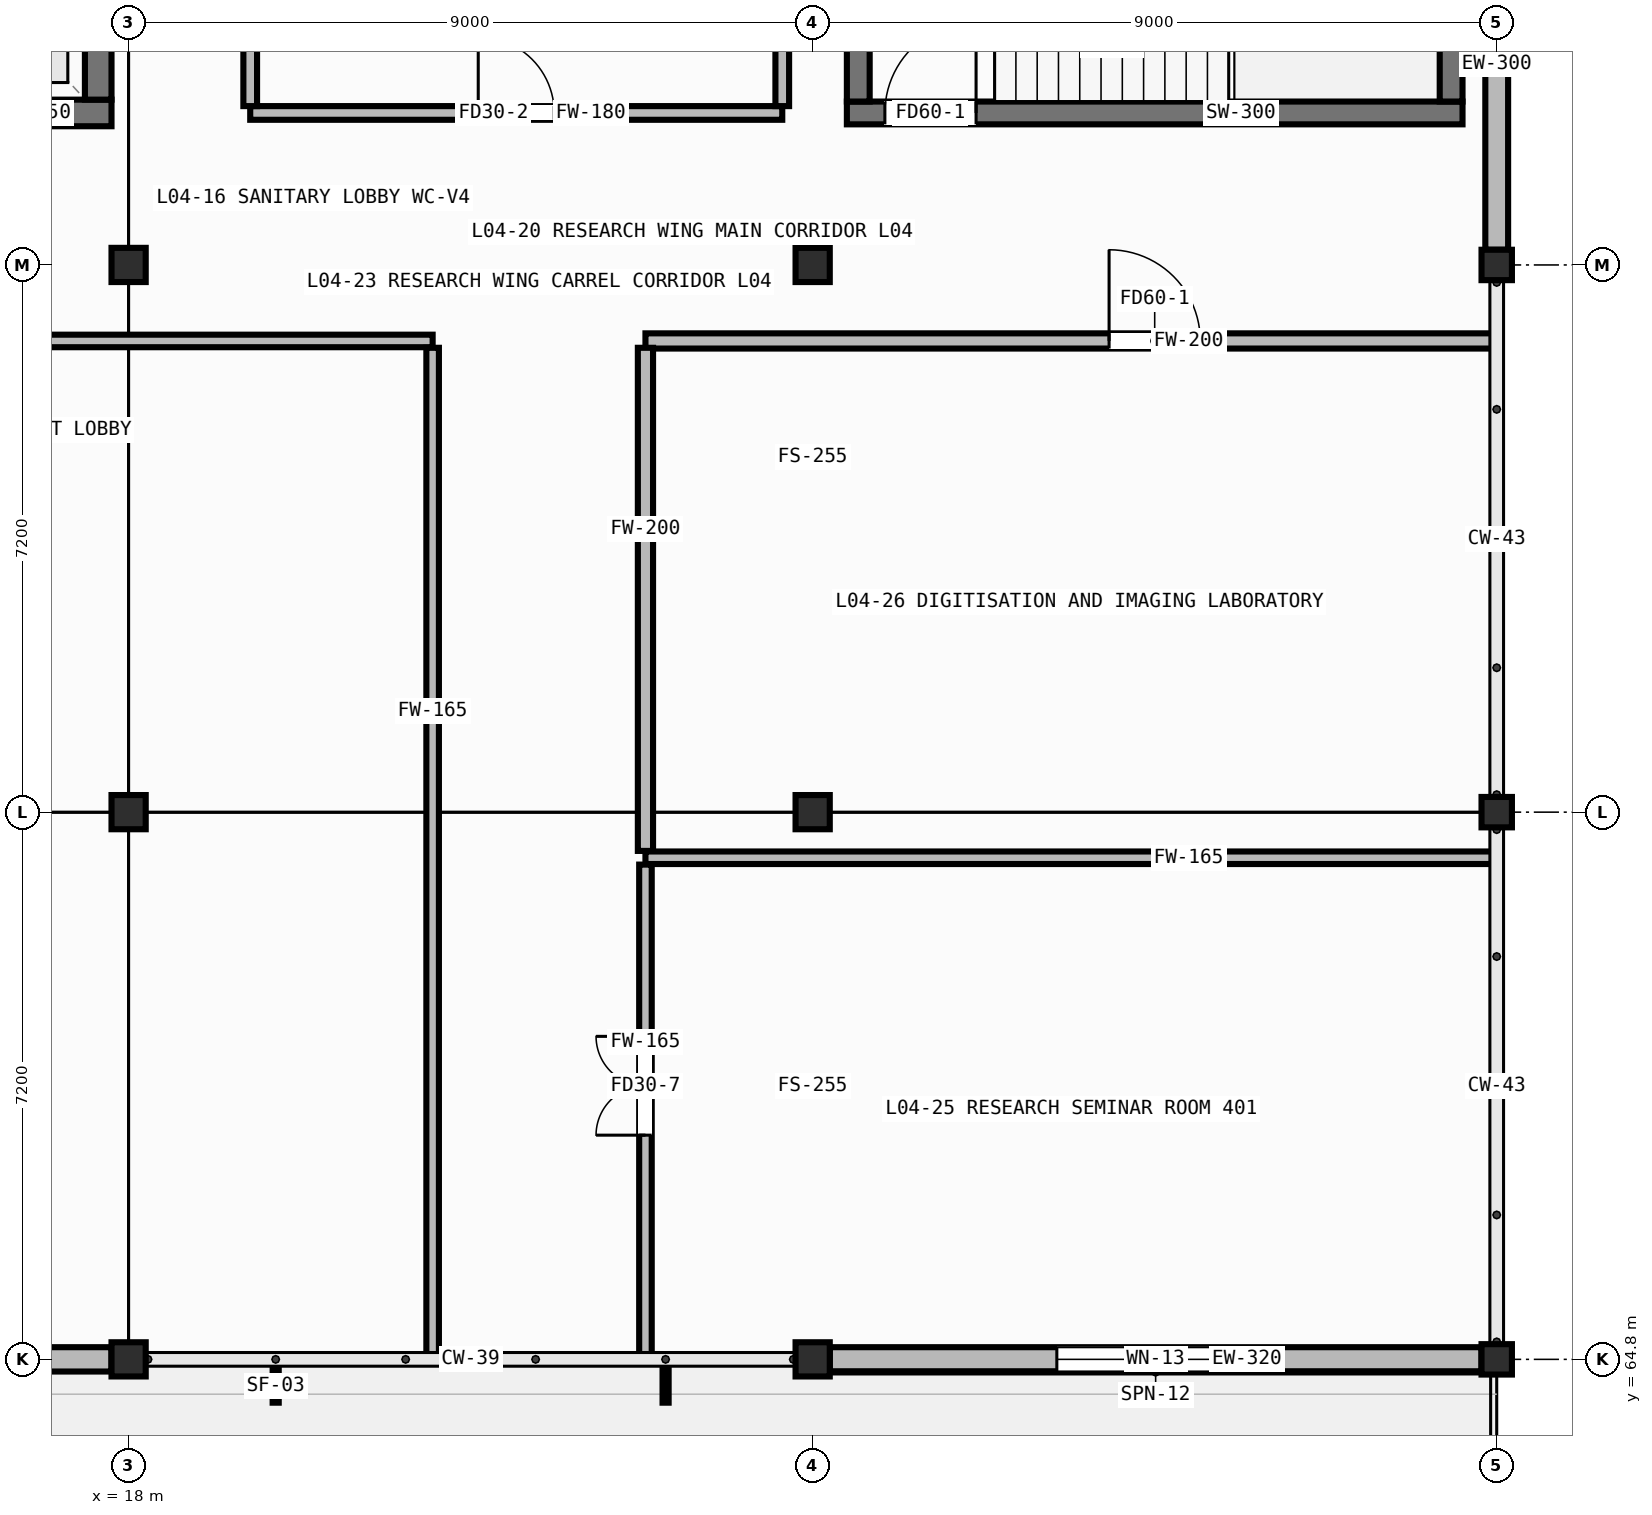
"""IFC4 building model, lengths in metres.
Left out: names, types, materials, properties, quantities, classifications, styles, units other than length and angle.
Written with IfcOpenShell. Run it as: python <this file> out.ifc"""

import sys

from ifc_helpers import new_model, si_unit, direction, frame, frame_2d, origin, origin_2d, place, context, subcontext, project, spatial, rectangle, hollow_rectangle, extrude, element, fill, save


model = new_model("IFC4")
c1 = context("Model", 3, precision=1e-05, world=origin(), true_north=direction((0.0, 1.0)))
c2 = subcontext(c1, "Body", "Model", "MODEL_VIEW")
j1 = project(units=[si_unit("LENGTHUNIT", "METRE"), si_unit("PLANEANGLEUNIT", "RADIAN")], contexts=[c1])
p1 = place(None, origin())
s1 = spatial("IfcSite", under=j1, at=p1, CompositionType="ELEMENT")
p2 = place(p1, origin())
s2 = spatial("IfcBuilding", under=s1, at=p2, CompositionType="ELEMENT")
p3 = place(p2, frame((0.0, 0.0, 12.8)))
s3 = spatial("IfcBuildingStorey", under=s2, at=p3, CompositionType="ELEMENT", Elevation=12.8)
for number, where, z_axis, x_axis in (
    (1, (18.0, 64.8, 0.0), (0.0, 0.0, 1.0), (1.0, 0.0, 0.0)),
    (2, (18.0, 72.0, 0.0), (0.0, 0.0, 1.0), (1.0, 0.0, 0.0)),
    (3, (18.0, 79.2, 0.0), (0.0, 0.0, 1.0), (1.0, 0.0, 0.0)),
    (4, (27.0, 64.8, 0.0), (0.0, 0.0, 1.0), (1.0, 0.0, 0.0)),
    (5, (27.0, 72.0, 0.0), (0.0, 0.0, 1.0), (1.0, 0.0, 0.0)),
    (6, (27.0, 79.2, 0.0), (0.0, 0.0, 1.0), (1.0, 0.0, 0.0)),
):
    element("IfcColumn", number, at=place(p3, frame(where, z_axis=z_axis, x_axis=x_axis)), inside=s3, PredefinedType="COLUMN", context=c2, shape_type="SweptSolid", body=[
        extrude(hollow_rectangle(XDim=0.45, YDim=0.45, WallThickness=0.019, at=origin_2d()), origin(), (0.0, 0.0, 1.0), 4.2),
    ])
for number, where, z_axis, x_axis in (
    (7, (36.0, 64.8, 0.0), (0.0, 0.0, 1.0), (1.0, 0.0, 0.0)),
    (8, (36.0, 72.0, 0.0), (0.0, 0.0, 1.0), (1.0, 0.0, 0.0)),
    (9, (36.0, 79.2, 0.0), (0.0, 0.0, 1.0), (1.0, 0.0, 0.0)),
):
    element("IfcColumn", number, at=place(p3, frame(where, z_axis=z_axis, x_axis=x_axis)), inside=s3, PredefinedType="COLUMN", context=c2, shape_type="SweptSolid", body=[
        extrude(hollow_rectangle(XDim=0.4, YDim=0.4, WallThickness=0.016, at=origin_2d()), origin(), (0.0, 0.0, 1.0), 4.2),
    ])
p4 = place(p3, frame((9.225, 64.8, 0.0), z_axis=(0.0, 0.0, 1.0), x_axis=(1.0, 0.0, 0.0)))
e10 = element("IfcWall", 10, at=p4, inside=s3, PredefinedType="STANDARD", context=c2, shape_type="SweptSolid", body=[
    extrude(rectangle(XDim=8.55, YDim=0.32, at=frame_2d((4.275, 0.0))), origin(), (0.0, 0.0, 1.0), 3.49),
])
p5 = place(p4, frame((3.4, 0.0, 0.0)))
e11 = element("IfcOpeningElement", 11, at=p5, cuts=e10, PredefinedType="OPENING", context=c2, shape_type="SweptSolid", body=[
    extrude(rectangle(XDim=1.75, YDim=2.12, at=frame_2d((0.875, 1.06))), frame((0.0, 0.172, 0.0), z_axis=(0.0, -1.0, 0.0), x_axis=(1.0, 0.0, 0.0)), (0.0, 0.0, 1.0), 0.344),
])
p6 = place(p3, frame((27.225, 64.8, 0.0), z_axis=(0.0, 0.0, 1.0), x_axis=(1.0, 0.0, 0.0)))
e12 = element("IfcWall", 12, at=p6, inside=s3, PredefinedType="STANDARD", context=c2, shape_type="SweptSolid", body=[
    extrude(rectangle(XDim=8.575, YDim=0.32, at=frame_2d((4.288, 0.0))), origin(), (0.0, 0.0, 1.0), 3.49),
])
p7 = place(p6, frame((2.988, 0.0, 0.85)))
e13 = element("IfcOpeningElement", 13, at=p7, cuts=e12, PredefinedType="OPENING", context=c2, shape_type="SweptSolid", body=[
    extrude(rectangle(XDim=2.6, YDim=1.6, at=frame_2d((1.3, 0.8))), frame((0.0, 0.172, 0.0), z_axis=(0.0, -1.0, 0.0), x_axis=(1.0, 0.0, 0.0)), (0.0, 0.0, 1.0), 0.344),
])
p8 = place(p3, frame((36.0, 86.2, 0.0), z_axis=(0.0, 0.0, 1.0), x_axis=(0.0, -1.0, 0.0)))
e14 = element("IfcWall", 14, at=p8, inside=s3, PredefinedType="STANDARD", context=c2, shape_type="SweptSolid", body=[
    extrude(rectangle(XDim=6.8, YDim=0.3, at=frame_2d((3.4, 0.0))), origin(), (0.0, 0.0, 1.0), 3.49),
])
p9 = place(p3, frame((27.45, 81.2, 0.0), z_axis=(0.0, 0.0, 1.0), x_axis=(1.0, 0.0, 0.0)))
e15 = element("IfcWall", 15, at=p9, inside=s3, PredefinedType="SHEAR", context=c2, shape_type="SweptSolid", body=[
    extrude(rectangle(XDim=8.1, YDim=0.3, at=frame_2d((4.05, 0.0))), origin(), (0.0, 0.0, 1.0), 3.94),
])
p10 = place(p9, frame((0.5, 0.0, 0.0)))
e16 = element("IfcOpeningElement", 16, at=p10, cuts=e15, PredefinedType="OPENING", context=c2, shape_type="SweptSolid", body=[
    extrude(rectangle(XDim=1.2, YDim=2.1, at=frame_2d((0.6, 1.05))), frame((0.0, 0.162, 0.0), z_axis=(0.0, -1.0, 0.0), x_axis=(1.0, 0.0, 0.0)), (0.0, 0.0, 1.0), 0.324),
])
for number, where, z_axis, x_axis in (
    (17, (27.6, 81.35, 0.0), (0.0, 0.0, 1.0), (0.0, 1.0, 0.0)),
    (18, (35.4, 81.35, 0.0), (0.0, 0.0, 1.0), (0.0, 1.0, 0.0)),
):
    element("IfcWall", number, at=place(p3, frame(where, z_axis=z_axis, x_axis=x_axis)), inside=s3, PredefinedType="SHEAR", context=c2, shape_type="SweptSolid", body=[
        extrude(rectangle(XDim=3.8, YDim=0.3, at=frame_2d((1.9, 0.0))), origin(), (0.0, 0.0, 1.0), 3.94),
    ])
p11 = place(p3, frame((15.025, 81.2, 0.0), z_axis=(0.0, 0.0, 1.0), x_axis=(1.0, 0.0, 0.0)))
e19 = element("IfcWall", 19, at=p11, inside=s3, PredefinedType="SHEAR", context=c2, shape_type="SweptSolid", body=[
    extrude(rectangle(XDim=2.75, YDim=0.35, at=frame_2d((1.375, 0.0))), origin(), (0.0, 0.0, 1.0), 3.94),
])
p12 = place(p11, frame((0.825, 0.0, 0.0)))
e20 = element("IfcOpeningElement", 20, at=p12, cuts=e19, PredefinedType="OPENING", context=c2, shape_type="SweptSolid", body=[
    extrude(rectangle(XDim=1.1, YDim=2.1, at=frame_2d((0.55, 1.05))), frame((0.0, 0.187, 0.0), z_axis=(0.0, -1.0, 0.0), x_axis=(1.0, 0.0, 0.0)), (0.0, 0.0, 1.0), 0.374),
])
p13 = place(p3, frame((17.6, 81.375, 0.0), z_axis=(0.0, 0.0, 1.0), x_axis=(0.0, 1.0, 0.0)))
e21 = element("IfcWall", 21, at=p13, inside=s3, PredefinedType="SHEAR", context=c2, shape_type="SweptSolid", body=[
    extrude(rectangle(XDim=2.25, YDim=0.35, at=frame_2d((1.125, 0.0))), origin(), (0.0, 0.0, 1.0), 3.94),
])
p14 = place(p3, frame((19.6, 81.2, 0.0), z_axis=(0.0, 0.0, 1.0), x_axis=(1.0, 0.0, 0.0)))
e22 = element("IfcWall", 22, at=p14, inside=s3, PredefinedType="PARTITIONING", context=c2, shape_type="SweptSolid", body=[
    extrude(rectangle(XDim=7.0, YDim=0.18, at=frame_2d((3.5, 0.0))), origin(), (0.0, 0.0, 1.0), 3.94),
])
p15 = place(p14, frame((3.0, 0.0, 0.0)))
e23 = element("IfcOpeningElement", 23, at=p15, cuts=e22, PredefinedType="OPENING", context=c2, shape_type="SweptSolid", body=[
    extrude(rectangle(XDim=1.0, YDim=2.08, at=frame_2d((0.5, 1.04))), frame((0.0, 0.102, 0.0), z_axis=(0.0, -1.0, 0.0), x_axis=(1.0, 0.0, 0.0)), (0.0, 0.0, 1.0), 0.204),
])
for number, where, z_axis, x_axis in (
    (24, (19.6, 81.29, 0.0), (0.0, 0.0, 1.0), (0.0, 1.0, 0.0)),
    (25, (26.6, 81.29, 0.0), (0.0, 0.0, 1.0), (0.0, 1.0, 0.0)),
):
    element("IfcWall", number, at=place(p3, frame(where, z_axis=z_axis, x_axis=x_axis)), inside=s3, PredefinedType="PARTITIONING", context=c2, shape_type="SweptSolid", body=[
        extrude(rectangle(XDim=2.22, YDim=0.18, at=frame_2d((1.11, 0.0))), origin(), (0.0, 0.0, 1.0), 3.94),
    ])
p16 = place(p3, frame((0.035, 78.2, 0.0), z_axis=(0.0, 0.0, 1.0), x_axis=(1.0, 0.0, 0.0)))
e26 = element("IfcWall", 26, at=p16, inside=s3, PredefinedType="PARTITIONING", context=c2, shape_type="SweptSolid", body=[
    extrude(rectangle(XDim=21.965, YDim=0.165, at=frame_2d((10.982, 0.0))), origin(), (0.0, 0.0, 1.0), 3.94),
])
p17 = place(p16, frame((3.615, 0.0, 0.0)))
e27 = element("IfcOpeningElement", 27, at=p17, cuts=e26, PredefinedType="OPENING", context=c2, shape_type="SweptSolid", body=[
    extrude(rectangle(XDim=1.7, YDim=2.12, at=frame_2d((0.85, 1.06))), frame((0.0, 0.094, 0.0), z_axis=(0.0, -1.0, 0.0), x_axis=(1.0, 0.0, 0.0)), (0.0, 0.0, 1.0), 0.189),
])
p18 = place(p3, frame((22.0, 64.835, 0.0), z_axis=(0.0, 0.0, 1.0), x_axis=(0.0, 1.0, 0.0)))
e28 = element("IfcWall", 28, at=p18, inside=s3, PredefinedType="PARTITIONING", context=c2, shape_type="SweptSolid", body=[
    extrude(rectangle(XDim=13.275, YDim=0.165, at=frame_2d((6.638, 0.0))), origin(), (0.0, 0.0, 1.0), 3.94),
])
p19 = place(p3, frame((24.8, 71.4, 0.0), z_axis=(0.0, 0.0, 1.0), x_axis=(1.0, 0.0, 0.0)))
e29 = element("IfcWall", 29, at=p19, inside=s3, PredefinedType="PARTITIONING", context=c2, shape_type="SweptSolid", body=[
    extrude(rectangle(XDim=11.165, YDim=0.165, at=frame_2d((5.583, 0.0))), origin(), (0.0, 0.0, 1.0), 3.94),
])
p20 = place(p3, frame((24.8, 64.835, 0.0), z_axis=(0.0, 0.0, 1.0), x_axis=(0.0, 1.0, 0.0)))
e30 = element("IfcWall", 30, at=p20, inside=s3, PredefinedType="PARTITIONING", context=c2, shape_type="SweptSolid", body=[
    extrude(rectangle(XDim=6.475, YDim=0.165, at=frame_2d((3.238, 0.0))), origin(), (0.0, 0.0, 1.0), 3.94),
])
p21 = place(p20, frame((2.915, 0.0, 0.0)))
e31 = element("IfcOpeningElement", 31, at=p21, cuts=e30, PredefinedType="OPENING", context=c2, shape_type="SweptSolid", body=[
    extrude(rectangle(XDim=1.3, YDim=2.08, at=frame_2d((0.65, 1.04))), frame((0.0, 0.094, 0.0), z_axis=(0.0, -1.0, 0.0), x_axis=(1.0, 0.0, 0.0)), (0.0, 0.0, 1.0), 0.189),
])
p22 = place(p3, frame((24.8, 78.2, 0.0), z_axis=(0.0, 0.0, 1.0), x_axis=(1.0, 0.0, 0.0)))
e32 = element("IfcWall", 32, at=p22, inside=s3, PredefinedType="PARTITIONING", context=c2, shape_type="SweptSolid", body=[
    extrude(rectangle(XDim=11.165, YDim=0.2, at=frame_2d((5.583, 0.0))), origin(), (0.0, 0.0, 1.0), 3.94),
])
p23 = place(p22, frame((6.1, 0.0, 0.0)))
e33 = element("IfcOpeningElement", 33, at=p23, cuts=e32, PredefinedType="OPENING", context=c2, shape_type="SweptSolid", body=[
    extrude(rectangle(XDim=1.2, YDim=2.1, at=frame_2d((0.6, 1.05))), frame((0.0, 0.112, 0.0), z_axis=(0.0, -1.0, 0.0), x_axis=(1.0, 0.0, 0.0)), (0.0, 0.0, 1.0), 0.224),
])
p24 = place(p3, frame((24.8, 71.49, 0.0), z_axis=(0.0, 0.0, 1.0), x_axis=(0.0, 1.0, 0.0)))
e34 = element("IfcWall", 34, at=p24, inside=s3, PredefinedType="PARTITIONING", context=c2, shape_type="SweptSolid", body=[
    extrude(rectangle(XDim=6.62, YDim=0.2, at=frame_2d((3.31, 0.0))), origin(), (0.0, 0.0, 1.0), 3.94),
])
p25 = place(p7, origin())
e35 = element("IfcWindow", 35, at=p25, inside=s3, PartitioningType="DOUBLE_PANEL_VERTICAL", PredefinedType="WINDOW", context=c2, shape_type="SweptSolid", body=[
    extrude(rectangle(XDim=2.6, YDim=1.6, at=frame_2d((1.3, 0.8))), frame((0.0, 0.03, 0.0), z_axis=(0.0, -1.0, 0.0), x_axis=(1.0, 0.0, 0.0)), (0.0, 0.0, 1.0), 0.06),
])
fill(e13, e35)
p26 = place(p10, origin())
e36 = element("IfcDoor", 36, at=p26, inside=s3, OperationType="SINGLE_SWING_RIGHT", PredefinedType="DOOR", context=c2, shape_type="SweptSolid", body=[
    extrude(rectangle(XDim=1.2, YDim=2.1, at=frame_2d((0.6, 1.05))), frame((0.0, 0.025, 0.0), z_axis=(0.0, -1.0, 0.0), x_axis=(1.0, 0.0, 0.0)), (0.0, 0.0, 1.0), 0.05),
])
fill(e16, e36)
p27 = place(p15, origin())
e37 = element("IfcDoor", 37, at=p27, inside=s3, OperationType="SINGLE_SWING_LEFT", PredefinedType="DOOR", context=c2, shape_type="SweptSolid", body=[
    extrude(rectangle(XDim=1.0, YDim=2.08, at=frame_2d((0.5, 1.04))), frame((0.0, 0.025, 0.0), z_axis=(0.0, -1.0, 0.0), x_axis=(1.0, 0.0, 0.0)), (0.0, 0.0, 1.0), 0.05),
])
fill(e23, e37)
p28 = place(p21, origin())
e38 = element("IfcDoor", 38, at=p28, inside=s3, OperationType="DOUBLE_DOOR_SINGLE_SWING", PredefinedType="DOOR", context=c2, shape_type="SweptSolid", body=[
    extrude(rectangle(XDim=1.3, YDim=2.08, at=frame_2d((0.65, 1.04))), frame((0.0, 0.025, 0.0), z_axis=(0.0, -1.0, 0.0), x_axis=(1.0, 0.0, 0.0)), (0.0, 0.0, 1.0), 0.05),
])
fill(e31, e38)
p29 = place(p23, origin())
e39 = element("IfcDoor", 39, at=p29, inside=s3, OperationType="SINGLE_SWING_LEFT", PredefinedType="DOOR", context=c2, shape_type="SweptSolid", body=[
    extrude(rectangle(XDim=1.2, YDim=2.1, at=frame_2d((0.6, 1.05))), frame((0.0, 0.025, 0.0), z_axis=(0.0, -1.0, 0.0), x_axis=(1.0, 0.0, 0.0)), (0.0, 0.0, 1.0), 0.05),
])
fill(e33, e39)
save(model, sys.argv[1])
